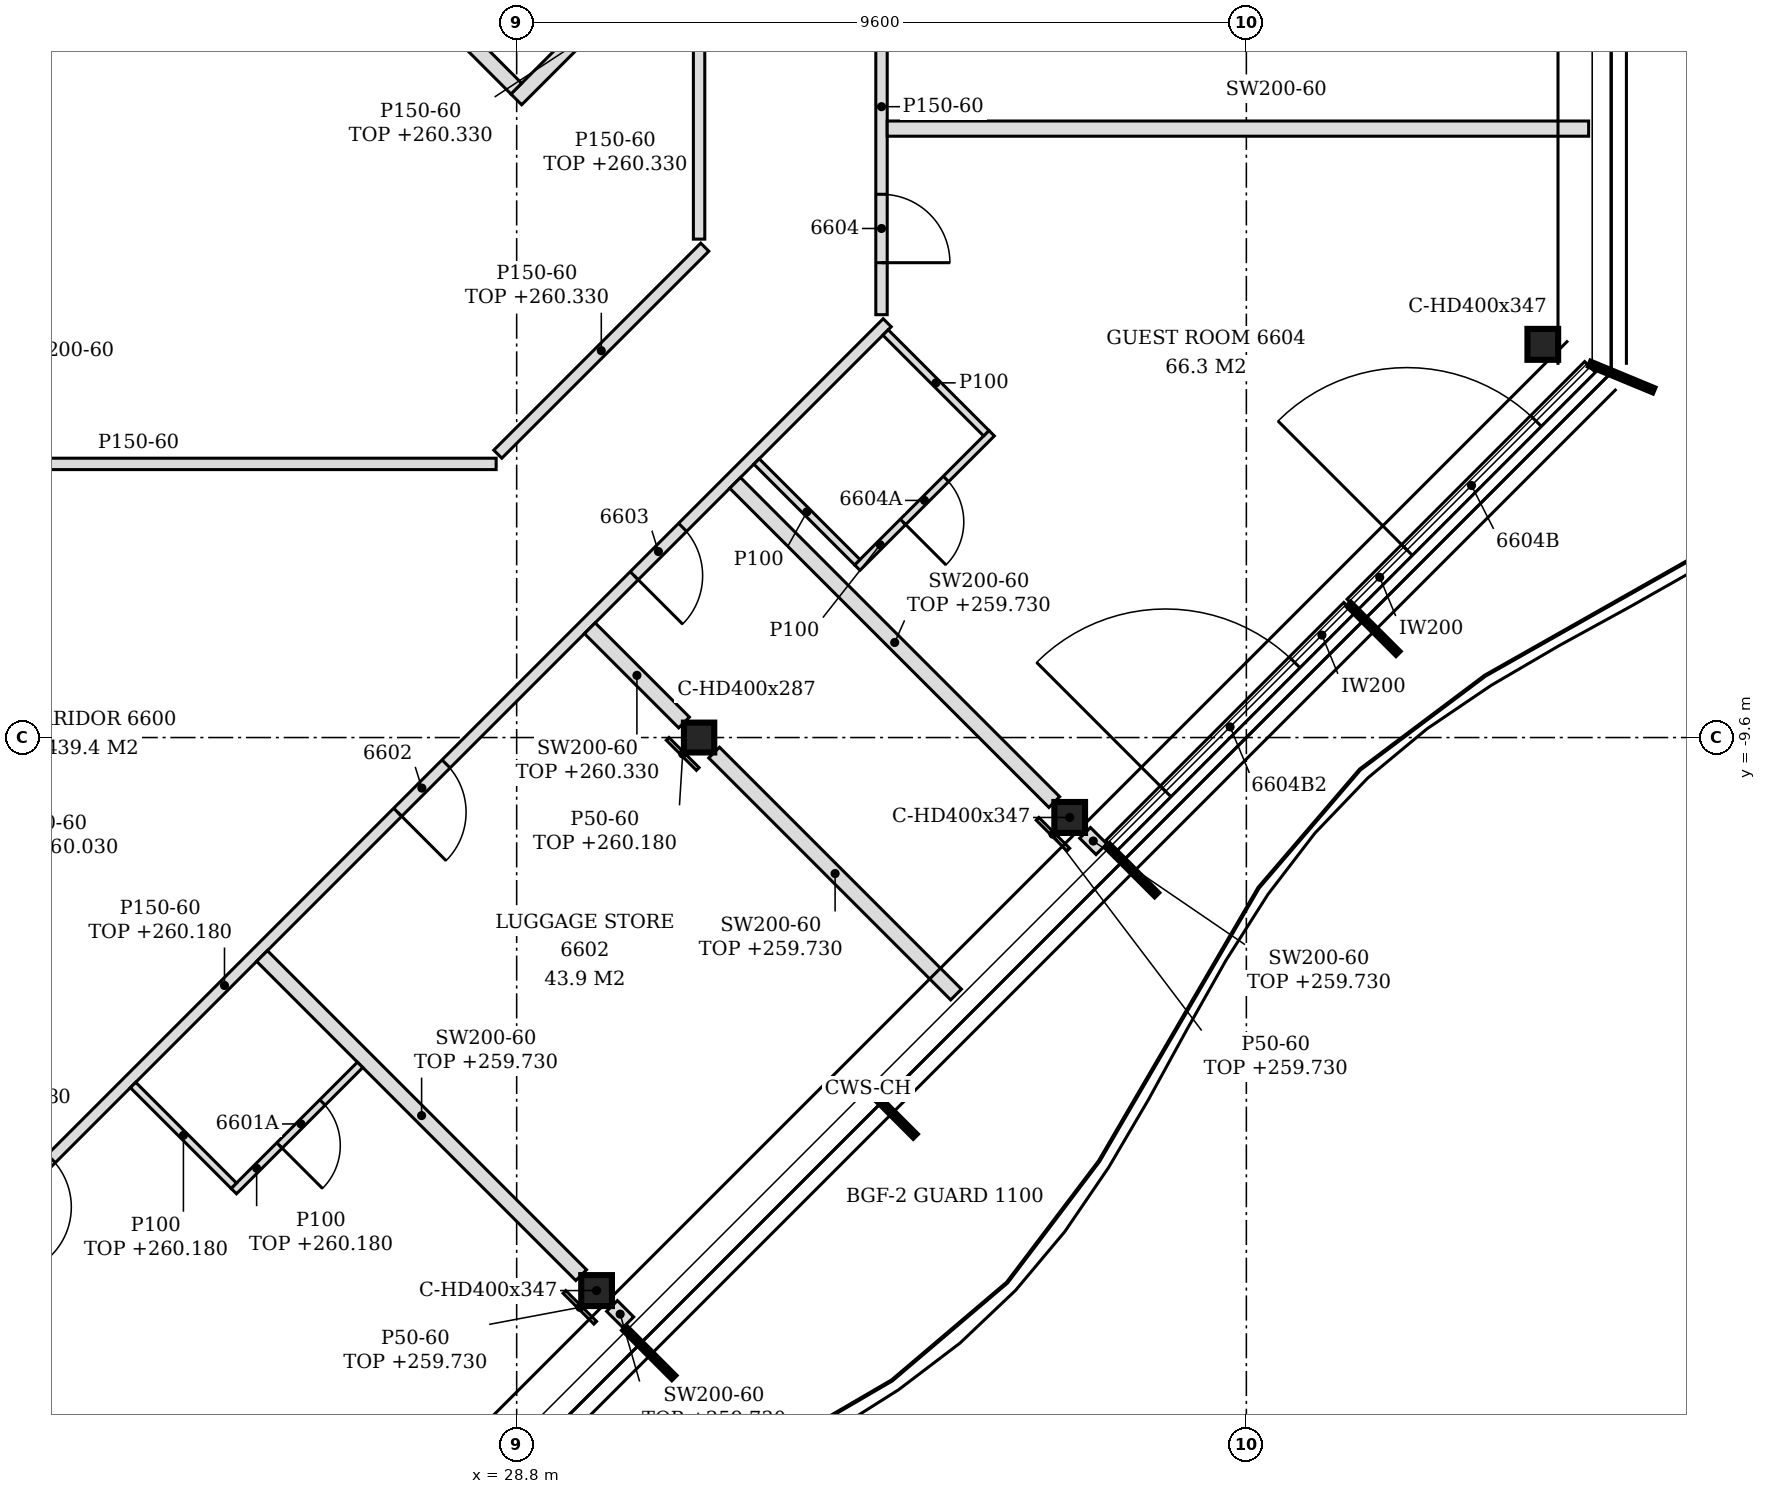
"""IFC4 building model, lengths in metres.
Left out: names, types, materials, properties, quantities, classifications, styles, units other than length and angle.
Written with IfcOpenShell. Run it as: python <this file> out.ifc"""

import sys

from ifc_helpers import new_model, si_unit, direction, frame, frame_2d, origin, origin_2d, place, context, subcontext, project, spatial, polyline, rectangle, i_section, outline, extrude, clip, halfspace, element, fill, save


model = new_model("IFC4")
c1 = context("Model", 3, precision=1e-05, world=origin(), true_north=direction((0.0, 1.0)))
c2 = subcontext(c1, "Body", "Model", "MODEL_VIEW")
j1 = project(units=[si_unit("LENGTHUNIT", "METRE"), si_unit("PLANEANGLEUNIT", "RADIAN")], contexts=[c1])
p1 = place(None, origin())
s1 = spatial("IfcSite", under=j1, at=p1, CompositionType="ELEMENT")
p2 = place(p1, origin())
s2 = spatial("IfcBuilding", under=s1, at=p2, CompositionType="ELEMENT")
p3 = place(p2, frame((0.0, 0.0, 257.4)))
s3 = spatial("IfcBuildingStorey", under=s2, at=p3, CompositionType="ELEMENT", Elevation=257.4)
for number, where, z_axis, x_axis in (
    (1, (29.852, -16.876, -0.15), (0.0, 0.0, 1.0), (1.0, 0.0, 0.0)),
    (2, (36.076, -10.652, -0.15), (0.0, 0.0, 1.0), (1.0, 0.0, 0.0)),
    (3, (42.3, -4.427, -0.15), (0.0, 0.0, 1.0), (1.0, 0.0, 0.0)),
):
    element("IfcColumn", number, at=place(p3, frame(where, z_axis=z_axis, x_axis=x_axis)), inside=s3, PredefinedType="COLUMN", context=c2, shape_type="Clipping", body=[
        clip(extrude(i_section(OverallWidth=0.404, OverallDepth=0.407, WebThickness=0.027, FlangeThickness=0.044, FilletRadius=0.015, at=origin_2d()), origin(), (0.0, 0.0, 1.0), 3.5), halfspace(frame((0.0, 0.0, 3.05), z_axis=(0.0, 0.0, 1.0), x_axis=(1.0, 0.0, 0.0)), False)),
    ])
p4 = place(p3, frame((31.2, -9.6, -0.15), z_axis=(0.0, 0.0, 1.0), x_axis=(1.0, 0.0, 0.0)))
e4 = element("IfcColumn", 4, at=p4, inside=s3, PredefinedType="COLUMN", context=c2, shape_type="SweptSolid", body=[
    extrude(i_section(OverallWidth=0.399, OverallDepth=0.393, WebThickness=0.023, FlangeThickness=0.037, FilletRadius=0.015, at=origin_2d()), origin(), (0.0, 0.0, 1.0), 3.5),
])
p5 = place(p3, frame((36.62, -11.026, 0.0), z_axis=(0.0, 0.0, 1.0), x_axis=(0.707106781187, 0.707106781187, 0.0)))
e5 = element("IfcWall", 5, at=p5, inside=s3, PredefinedType="NOTDEFINED", context=c2, shape_type="SweptSolid", body=[
    extrude(rectangle(XDim=4.431, YDim=0.2, at=frame_2d((2.215, 0.0))), origin(), (0.0, 0.0, 1.0), 3.35),
])
p6 = place(p5, frame((1.015, 0.0, 0.0)))
e6 = element("IfcOpeningElement", 6, at=p6, cuts=e5, PredefinedType="OPENING", context=c2, shape_type="SweptSolid", body=[
    extrude(rectangle(XDim=2.4, YDim=2.4, at=frame_2d((1.2, 1.2))), frame((0.0, 0.11, 0.0), z_axis=(0.0, -1.0, 0.0), x_axis=(1.0, 0.0, 0.0)), (0.0, 0.0, 1.0), 0.22),
])
p7 = place(p3, frame((39.796, -7.851, 0.0), z_axis=(0.0, 0.0, 1.0), x_axis=(0.707079168996, 0.707134392299, 0.0)))
e7 = element("IfcWall", 7, at=p7, inside=s3, PredefinedType="NOTDEFINED", context=c2, shape_type="SweptSolid", body=[
    extrude(rectangle(XDim=4.421, YDim=0.2, at=frame_2d((2.21, 0.0))), origin(), (0.0, 0.0, 1.0), 3.35),
])
p8 = place(p7, frame((1.015, 0.0, 0.0)))
e8 = element("IfcOpeningElement", 8, at=p8, cuts=e7, PredefinedType="OPENING", context=c2, shape_type="SweptSolid", body=[
    extrude(rectangle(XDim=2.4, YDim=2.33, at=frame_2d((1.2, 1.165))), frame((0.0, 0.11, 0.0), z_axis=(0.0, -1.0, 0.0), x_axis=(1.0, 0.0, 0.0)), (0.0, 0.0, 1.0), 0.22),
])
p9 = place(p3, frame((30.269, -17.293, 0.0), z_axis=(0.0, 0.0, 1.0), x_axis=(-0.707509117806, 0.706704215511, 0.0)))
e9 = element("IfcWall", 9, at=p9, inside=s3, PredefinedType="PARTITIONING", context=c2, shape_type="SweptSolid", body=[
    extrude(rectangle(XDim=0.303, YDim=0.2, at=frame_2d((0.152, 0.0))), origin(), (0.0, 0.0, 1.0), 2.33),
])
p10 = place(p3, frame((21.146, -16.672, 0.0), z_axis=(0.0, 0.0, 1.0), x_axis=(0.707106781187, 0.707106781187, 0.0)))
e10 = element("IfcWall", 10, at=p10, inside=s3, PredefinedType="PARTITIONING", context=c2, shape_type="SweptSolid", body=[
    extrude(rectangle(XDim=17.719, YDim=0.15, at=frame_2d((8.859, 0.0))), origin(), (0.0, 0.0, 1.0), 2.78),
])
p11 = place(p10, frame((1.266, 0.0, 0.0)))
e11 = element("IfcOpeningElement", 11, at=p11, cuts=e10, PredefinedType="OPENING", context=c2, shape_type="SweptSolid", body=[
    extrude(rectangle(XDim=0.9, YDim=2.1, at=frame_2d((0.45, 1.05))), frame((0.0, 0.085, 0.0), z_axis=(0.0, -1.0, 0.0), x_axis=(1.0, 0.0, 0.0)), (0.0, 0.0, 1.0), 0.17),
])
p12 = place(p10, frame((8.611, 0.0, 0.0)))
e12 = element("IfcOpeningElement", 12, at=p12, cuts=e10, PredefinedType="OPENING", context=c2, shape_type="SweptSolid", body=[
    extrude(rectangle(XDim=0.9, YDim=2.1, at=frame_2d((0.45, 1.05))), frame((0.0, 0.085, 0.0), z_axis=(0.0, -1.0, 0.0), x_axis=(1.0, 0.0, 0.0)), (0.0, 0.0, 1.0), 0.17),
])
p13 = place(p10, frame((13.012, 0.0, 0.0)))
e13 = element("IfcOpeningElement", 13, at=p13, cuts=e10, PredefinedType="OPENING", context=c2, shape_type="SweptSolid", body=[
    extrude(rectangle(XDim=0.9, YDim=2.1, at=frame_2d((0.45, 1.05))), frame((0.0, 0.085, 0.0), z_axis=(0.0, -1.0, 0.0), x_axis=(1.0, 0.0, 0.0)), (0.0, 0.0, 1.0), 0.17),
])
p14 = place(p3, frame((29.649, -16.673, 0.0), z_axis=(0.0, 0.0, 1.0), x_axis=(-0.70712733811, 0.707086223665, 0.0)))
e14 = element("IfcWall", 14, at=p14, inside=s3, PredefinedType="PARTITIONING", context=c2, shape_type="SweptSolid", body=[
    extrude(rectangle(XDim=5.938, YDim=0.2, at=frame_2d((2.969, 0.0))), origin(), (0.0, 0.0, 1.0), 2.33),
])
p15 = place(p3, frame((25.079, -15.567, 0.0), z_axis=(0.0, 0.0, 1.0), x_axis=(0.707106781187, 0.707106781187, 0.0)))
e15 = element("IfcWall", 15, at=p15, inside=s3, PredefinedType="PARTITIONING", context=c2, shape_type="SweptSolid", body=[
    extrude(rectangle(XDim=2.35, YDim=0.1, at=frame_2d((1.175, 0.0))), origin(), (0.0, 0.0, 1.0), 2.78),
])
p16 = place(p15, frame((0.85, 0.0, 0.0)))
e16 = element("IfcOpeningElement", 16, at=p16, cuts=e15, PredefinedType="OPENING", context=c2, shape_type="SweptSolid", body=[
    extrude(rectangle(XDim=0.8, YDim=2.1, at=frame_2d((0.4, 1.05))), frame((0.0, 0.06, 0.0), z_axis=(0.0, -1.0, 0.0), x_axis=(1.0, 0.0, 0.0)), (0.0, 0.0, 1.0), 0.12),
])
p17 = place(p3, frame((25.079, -15.497, 0.0), z_axis=(0.0, 0.0, 1.0), x_axis=(-0.707106781187, 0.707106781187, 0.0)))
e17 = element("IfcWall", 17, at=p17, inside=s3, PredefinedType="PARTITIONING", context=c2, shape_type="SweptSolid", body=[
    extrude(rectangle(XDim=1.875, YDim=0.1, at=frame_2d((0.938, 0.0))), origin(), (0.0, 0.0, 1.0), 2.78),
])
p18 = place(p3, frame((34.581, -12.981, 0.0), z_axis=(0.0, 0.0, 1.0), x_axis=(-0.707133900936, 0.707079660397, 0.0)))
e18 = element("IfcWall", 18, at=p18, inside=s3, PredefinedType="PARTITIONING", context=c2, shape_type="SweptSolid", body=[
    extrude(rectangle(XDim=4.501, YDim=0.2, at=frame_2d((2.25, 0.0))), origin(), (0.0, 0.0, 1.0), 2.33),
])
p19 = place(p3, frame((36.493, -11.069, 0.0), z_axis=(0.0, 0.0, 1.0), x_axis=(-0.707106781187, 0.707106781187, 0.0)))
e19 = element("IfcWall", 19, at=p19, inside=s3, PredefinedType="PARTITIONING", context=c2, shape_type="SweptSolid", body=[
    extrude(rectangle(XDim=0.303, YDim=0.2, at=frame_2d((0.152, 0.0))), origin(), (0.0, 0.0, 1.0), 2.33),
])
p20 = place(p3, frame((35.873, -10.449, 0.0), z_axis=(0.0, 0.0, 1.0), x_axis=(-0.707086223665, 0.70712733811, 0.0)))
e20 = element("IfcWall", 20, at=p20, inside=s3, PredefinedType="PARTITIONING", context=c2, shape_type="SweptSolid", body=[
    extrude(rectangle(XDim=5.938, YDim=0.2, at=frame_2d((2.969, 0.0))), origin(), (0.0, 0.0, 1.0), 2.33),
])
p21 = place(p3, frame((31.002, -9.402, 0.0), z_axis=(0.0, 0.0, 1.0), x_axis=(-0.707106781187, 0.707106781187, 0.0)))
e21 = element("IfcWall", 21, at=p21, inside=s3, PredefinedType="PARTITIONING", context=c2, shape_type="SweptSolid", body=[
    extrude(rectangle(XDim=1.754, YDim=0.2, at=frame_2d((0.877, 0.0))), origin(), (0.0, 0.0, 1.0), 2.93),
])
p22 = place(p3, frame((33.281, -7.365, 0.0), z_axis=(0.0, 0.0, 1.0), x_axis=(0.707106781187, 0.707106781187, 0.0)))
e22 = element("IfcWall", 22, at=p22, inside=s3, PredefinedType="PARTITIONING", context=c2, shape_type="SweptSolid", body=[
    extrude(rectangle(XDim=2.5, YDim=0.1, at=frame_2d((1.25, 0.0))), origin(), (0.0, 0.0, 1.0), 3.35),
])
p23 = place(p22, frame((0.85, 0.0, 0.0)))
e23 = element("IfcOpeningElement", 23, at=p23, cuts=e22, PredefinedType="OPENING", context=c2, shape_type="SweptSolid", body=[
    extrude(rectangle(XDim=0.8, YDim=2.1, at=frame_2d((0.4, 1.05))), frame((0.0, 0.06, 0.0), z_axis=(0.0, -1.0, 0.0), x_axis=(1.0, 0.0, 0.0)), (0.0, 0.0, 1.0), 0.12),
])
p24 = place(p3, frame((33.281, -7.294, 0.0), z_axis=(0.0, 0.0, 1.0), x_axis=(-0.707041661071, 0.707171895306, 0.0)))
e24 = element("IfcWall", 24, at=p24, inside=s3, PredefinedType="PARTITIONING", context=c2, shape_type="SweptSolid", body=[
    extrude(rectangle(XDim=1.875, YDim=0.1, at=frame_2d((0.937, 0.0))), origin(), (0.0, 0.0, 1.0), 3.35),
])
p25 = place(p3, frame((19.125, -6.0, 0.0), z_axis=(0.0, 0.0, 1.0), x_axis=(1.0, 0.0, 0.0)))
e25 = element("IfcWall", 25, at=p25, inside=s3, PredefinedType="PARTITIONING", context=c2, shape_type="SweptSolid", body=[
    extrude(outline(polyline([(0.0, 0.0), (9.405, 0.0), (9.405, 3.35), (0.225, 3.35), (0.223, 2.73), (0.0, 2.73), (0.0, 0.0)])), frame((0.0, 0.075, 0.0), z_axis=(0.0, -1.0, 0.0), x_axis=(1.0, 0.0, 0.0)), (0.0, 0.0, 1.0), 0.15),
])
p26 = place(p3, frame((28.552, -5.872, 0.0), z_axis=(0.0, 0.0, 1.0), x_axis=(0.707075081602, 0.70713847935, 0.0)))
e26 = element("IfcWall", 26, at=p26, inside=s3, PredefinedType="PARTITIONING", context=c2, shape_type="SweptSolid", body=[
    extrude(rectangle(XDim=3.851, YDim=0.15, at=frame_2d((1.925, 0.0))), origin(), (0.0, 0.0, 1.0), 2.93),
])
p27 = place(p3, frame((34.979, -5.597, 0.0), z_axis=(0.0, 0.0, 1.0), x_axis=(-0.707041661071, 0.707171895306, 0.0)))
e27 = element("IfcWall", 27, at=p27, inside=s3, PredefinedType="PARTITIONING", context=c2, shape_type="SweptSolid", body=[
    extrude(rectangle(XDim=1.875, YDim=0.1, at=frame_2d((0.937, 0.0))), origin(), (0.0, 0.0, 1.0), 3.35),
])
p28 = place(p3, frame((33.6, -4.037, 0.0), z_axis=(0.0, 0.0, 1.0), x_axis=(0.0, 1.0, 0.0)))
e28 = element("IfcWall", 28, at=p28, inside=s3, PredefinedType="PARTITIONING", context=c2, shape_type="SweptSolid", body=[
    extrude(rectangle(XDim=6.337, YDim=0.15, at=frame_2d((3.168, 0.0))), origin(), (0.0, 0.0, 1.0), 3.35),
])
p29 = place(p28, frame((0.684, 0.0, 0.0)))
e29 = element("IfcOpeningElement", 29, at=p29, cuts=e28, PredefinedType="OPENING", context=c2, shape_type="SweptSolid", body=[
    extrude(rectangle(XDim=0.9, YDim=2.1, at=frame_2d((0.45, 1.05))), frame((0.0, 0.085, 0.0), z_axis=(0.0, -1.0, 0.0), x_axis=(1.0, 0.0, 0.0)), (0.0, 0.0, 1.0), 0.17),
])
p30 = place(p28, frame((3.889, 0.0, 0.0)))
e30 = element("IfcOpeningElement", 30, at=p30, cuts=e28, PredefinedType="OPENING", context=c2, shape_type="SweptSolid", body=[
    extrude(rectangle(XDim=0.9, YDim=2.1, at=frame_2d((0.45, 1.05))), frame((0.0, 0.085, 0.0), z_axis=(0.0, -1.0, 0.0), x_axis=(1.0, 0.0, 0.0)), (0.0, 0.0, 1.0), 0.17),
])
p31 = place(p3, frame((31.2, -3.043, 0.0), z_axis=(0.0, 0.0, 1.0), x_axis=(0.0, 1.0, 0.0)))
e31 = element("IfcWall", 31, at=p31, inside=s3, PredefinedType="PARTITIONING", context=c2, shape_type="SweptSolid", body=[
    extrude(rectangle(XDim=2.846, YDim=0.15, at=frame_2d((1.423, 0.0))), origin(), (0.0, 0.0, 1.0), 2.93),
])
p32 = place(p3, frame((33.675, -1.589, 0.0), z_axis=(0.0, 0.0, 1.0), x_axis=(1.0, 0.0, 0.0)))
e32 = element("IfcWall", 32, at=p32, inside=s3, PredefinedType="PARTITIONING", context=c2, shape_type="SweptSolid", body=[
    extrude(outline(polyline([(0.0, 0.0), (9.228, 0.0), (9.228, 3.35), (9.125, 3.35), (9.123, 2.33), (8.125, 2.33), (8.123, 3.35), (0.0, 3.35), (0.0, 0.0)])), frame((0.0, 0.1, 0.0), z_axis=(0.0, -1.0, 0.0), x_axis=(1.0, 0.0, 0.0)), (0.0, 0.0, 1.0), 0.2),
])
p33 = place(p3, frame((28.795, -1.205, 0.0), z_axis=(0.0, 0.0, 1.0), x_axis=(0.707106781187, 0.707106781187, 0.0)))
e33 = element("IfcWall", 33, at=p33, inside=s3, PredefinedType="PARTITIONING", context=c2, shape_type="SweptSolid", body=[
    extrude(rectangle(XDim=3.517, YDim=0.2, at=frame_2d((1.758, 0.0))), origin(), (0.0, 0.0, 1.0), 2.93),
])
p34 = place(p3, frame((28.795, -1.063, 0.0), z_axis=(0.0, 0.0, 1.0), x_axis=(-0.706656947409, 0.707556328979, 0.0)))
e34 = element("IfcWall", 34, at=p34, inside=s3, PredefinedType="PARTITIONING", context=c2, shape_type="SweptSolid", body=[
    extrude(rectangle(XDim=1.9, YDim=0.2, at=frame_2d((0.95, 0.0))), origin(), (0.0, 0.0, 1.0), 3.35),
])
p35 = place(p3, frame((29.834, -17.299, 0.0), z_axis=(0.0, 0.0, 1.0), x_axis=(-0.707106781187, 0.707106781187, 0.0)))
e35 = element("IfcWall", 35, at=p35, inside=s3, PredefinedType="PARTITIONING", context=c2, shape_type="SweptSolid", body=[
    extrude(rectangle(XDim=0.573, YDim=0.05, at=frame_2d((0.287, 0.0))), origin(), (0.0, 0.0, 1.0), 2.33),
])
p36 = place(p3, frame((31.182, -10.014, 0.0), z_axis=(0.0, 0.0, 1.0), x_axis=(-0.707106781187, 0.707106781187, 0.0)))
e36 = element("IfcWall", 36, at=p36, inside=s3, PredefinedType="PARTITIONING", context=c2, shape_type="SweptSolid", body=[
    extrude(rectangle(XDim=0.56, YDim=0.05, at=frame_2d((0.28, 0.0))), origin(), (0.0, 0.0, 1.0), 2.78),
])
p37 = place(p3, frame((36.058, -11.075, 0.0), z_axis=(0.0, 0.0, 1.0), x_axis=(-0.707106781187, 0.707106781187, 0.0)))
e37 = element("IfcWall", 37, at=p37, inside=s3, PredefinedType="PARTITIONING", context=c2, shape_type="SweptSolid", body=[
    extrude(rectangle(XDim=0.573, YDim=0.05, at=frame_2d((0.287, 0.0))), origin(), (0.0, 0.0, 1.0), 2.33),
])
p38 = place(p6, origin())
e38 = element("IfcDoor", 38, at=p38, inside=s3, OperationType="SINGLE_SWING_LEFT", PredefinedType="DOOR", context=c2, shape_type="SweptSolid", body=[
    extrude(rectangle(XDim=2.4, YDim=2.4, at=frame_2d((1.2, 1.2))), frame((0.0, 0.025, 0.0), z_axis=(0.0, -1.0, 0.0), x_axis=(1.0, 0.0, 0.0)), (0.0, 0.0, 1.0), 0.05),
])
fill(e6, e38)
p39 = place(p8, origin())
e39 = element("IfcDoor", 39, at=p39, inside=s3, OperationType="SINGLE_SWING_LEFT", PredefinedType="DOOR", context=c2, shape_type="SweptSolid", body=[
    extrude(rectangle(XDim=2.4, YDim=2.33, at=frame_2d((1.2, 1.165))), frame((0.0, 0.025, 0.0), z_axis=(0.0, -1.0, 0.0), x_axis=(1.0, 0.0, 0.0)), (0.0, 0.0, 1.0), 0.05),
])
fill(e8, e39)
p40 = place(p16, frame((0.8, 0.0, 0.0), z_axis=(0.0, 0.0, 1.0), x_axis=(-1.0, 0.0, 0.0)))
e40 = element("IfcDoor", 40, at=p40, inside=s3, OperationType="SINGLE_SWING_RIGHT", PredefinedType="DOOR", context=c2, shape_type="SweptSolid", body=[
    extrude(rectangle(XDim=0.8, YDim=2.1, at=frame_2d((0.4, 1.05))), frame((0.0, 0.025, 0.0), z_axis=(0.0, -1.0, 0.0), x_axis=(1.0, 0.0, 0.0)), (0.0, 0.0, 1.0), 0.05),
])
fill(e16, e40)
p41 = place(p12, frame((0.9, 0.0, 0.0), z_axis=(0.0, 0.0, 1.0), x_axis=(-1.0, 0.0, 0.0)))
e41 = element("IfcDoor", 41, at=p41, inside=s3, OperationType="SINGLE_SWING_RIGHT", PredefinedType="DOOR", context=c2, shape_type="SweptSolid", body=[
    extrude(rectangle(XDim=0.9, YDim=2.1, at=frame_2d((0.45, 1.05))), frame((0.0, 0.025, 0.0), z_axis=(0.0, -1.0, 0.0), x_axis=(1.0, 0.0, 0.0)), (0.0, 0.0, 1.0), 0.05),
])
fill(e12, e41)
p42 = place(p13, frame((0.9, 0.0, 0.0), z_axis=(0.0, 0.0, 1.0), x_axis=(-1.0, 0.0, 0.0)))
e42 = element("IfcDoor", 42, at=p42, inside=s3, OperationType="SINGLE_SWING_RIGHT", PredefinedType="DOOR", context=c2, shape_type="SweptSolid", body=[
    extrude(rectangle(XDim=0.9, YDim=2.1, at=frame_2d((0.45, 1.05))), frame((0.0, 0.025, 0.0), z_axis=(0.0, -1.0, 0.0), x_axis=(1.0, 0.0, 0.0)), (0.0, 0.0, 1.0), 0.05),
])
fill(e13, e42)
p43 = place(p29, frame((0.9, 0.0, 0.0), z_axis=(0.0, 0.0, 1.0), x_axis=(-1.0, 0.0, 0.0)))
e43 = element("IfcDoor", 43, at=p43, inside=s3, OperationType="SINGLE_SWING_RIGHT", PredefinedType="DOOR", context=c2, shape_type="SweptSolid", body=[
    extrude(rectangle(XDim=0.9, YDim=2.1, at=frame_2d((0.45, 1.05))), frame((0.0, 0.025, 0.0), z_axis=(0.0, -1.0, 0.0), x_axis=(1.0, 0.0, 0.0)), (0.0, 0.0, 1.0), 0.05),
])
fill(e29, e43)
p44 = place(p23, frame((0.8, 0.0, 0.0), z_axis=(0.0, 0.0, 1.0), x_axis=(-1.0, 0.0, 0.0)))
e44 = element("IfcDoor", 44, at=p44, inside=s3, OperationType="SINGLE_SWING_RIGHT", PredefinedType="DOOR", context=c2, shape_type="SweptSolid", body=[
    extrude(rectangle(XDim=0.8, YDim=2.1, at=frame_2d((0.4, 1.05))), frame((0.0, 0.025, 0.0), z_axis=(0.0, -1.0, 0.0), x_axis=(1.0, 0.0, 0.0)), (0.0, 0.0, 1.0), 0.05),
])
fill(e23, e44)
save(model, sys.argv[1])
